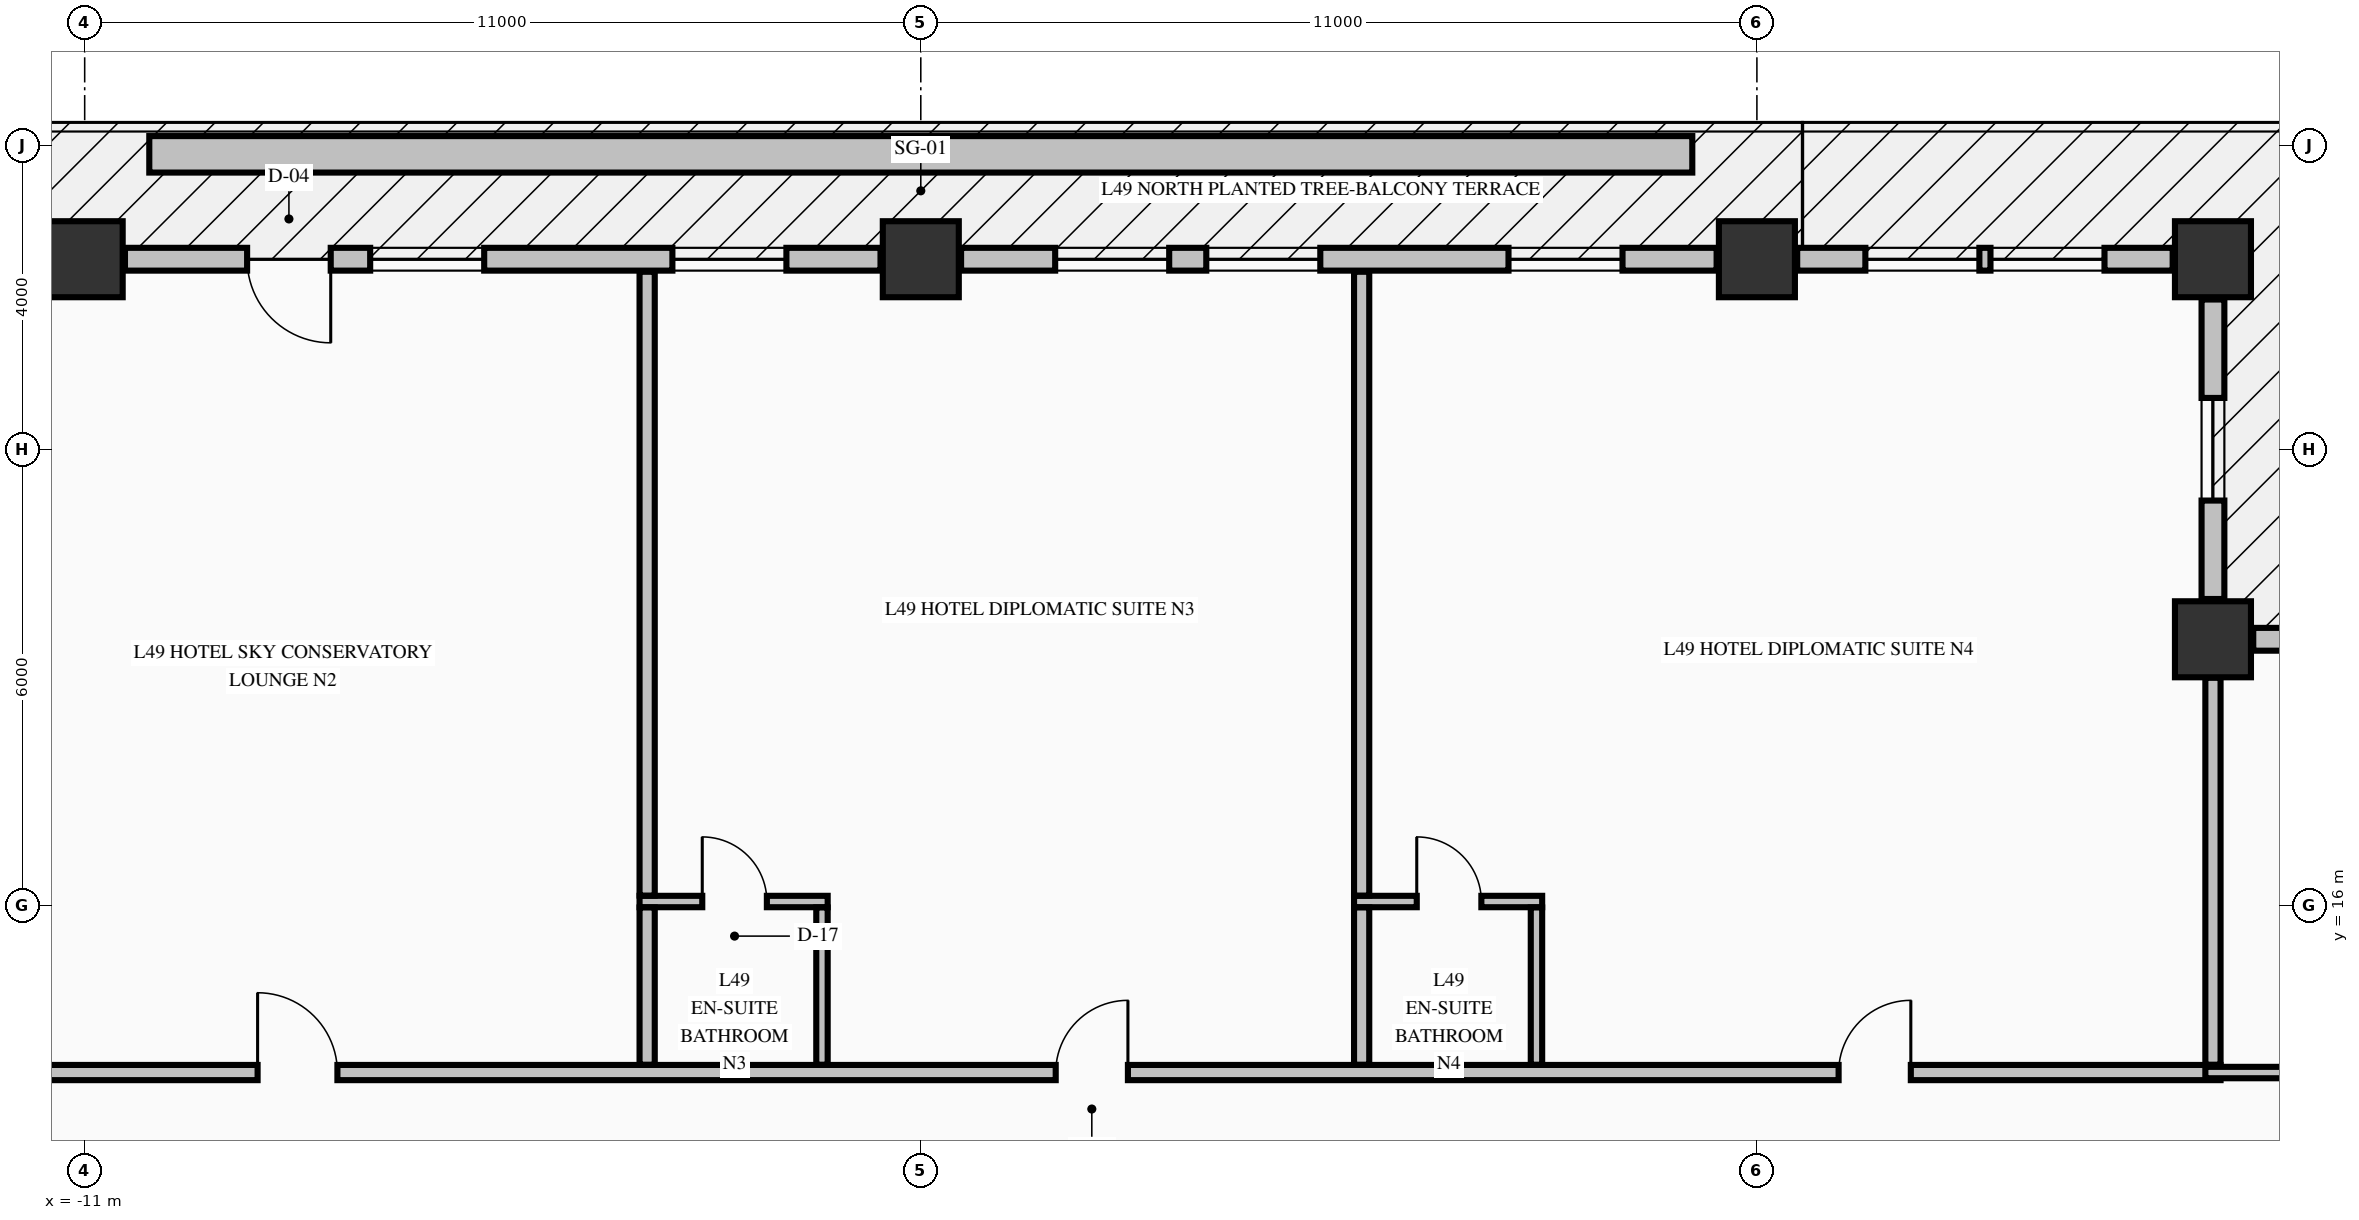
"""IFC4 building model, lengths in metres.
Left out: names, types, materials, properties, quantities, classifications, styles, units other than length and angle.
Written with IfcOpenShell. Run it as: python <this file> out.ifc"""

import sys

from ifc_helpers import new_model, si_unit, direction, frame, frame_2d, origin, origin_2d, place, context, subcontext, project, spatial, rectangle, extrude, element, fill, save


model = new_model("IFC4")
c1 = context("Model", 3, precision=1e-05, world=origin(), true_north=direction((0.0, 1.0)))
c2 = subcontext(c1, "Body", "Model", "MODEL_VIEW")
j1 = project(units=[si_unit("LENGTHUNIT", "METRE"), si_unit("PLANEANGLEUNIT", "RADIAN")], contexts=[c1])
p1 = place(None, origin())
s1 = spatial("IfcSite", under=j1, at=p1, CompositionType="ELEMENT")
p2 = place(p1, origin())
s2 = spatial("IfcBuilding", under=s1, at=p2, CompositionType="ELEMENT")
p3 = place(p2, frame((0.0, 0.0, 191.46)))
s3 = spatial("IfcBuildingStorey", under=s2, at=p3, CompositionType="ELEMENT", Elevation=191.46)
for number, where, z_axis, x_axis in (
    (1, (-11.0, 24.5, -0.425), (0.0, 0.0, 1.0), (1.0, 0.0, 0.0)),
    (2, (0.0, 24.5, -0.425), (0.0, 0.0, 1.0), (1.0, 0.0, 0.0)),
    (3, (11.0, 24.5, -0.425), (0.0, 0.0, 1.0), (1.0, 0.0, 0.0)),
    (4, (17.0, 24.5, -0.425), (0.0, 0.0, 1.0), (1.0, 0.0, 0.0)),
    (5, (17.0, 19.5, -0.425), (0.0, 0.0, 1.0), (1.0, 0.0, 0.0)),
):
    element("IfcColumn", number, at=place(p3, frame(where, z_axis=z_axis, x_axis=x_axis)), inside=s3, PredefinedType="COLUMN", context=c2, shape_type="SweptSolid", body=[
        extrude(rectangle(XDim=1.0, YDim=1.0, at=origin_2d()), origin(), (0.0, 0.0, 1.0), 3.55),
    ])
p4 = place(p3, frame((21.47, 19.5, 0.0), z_axis=(0.0, 0.0, 1.0), x_axis=(-1.0, 0.0, 0.0)))
e6 = element("IfcWall", 6, at=p4, inside=s3, PredefinedType="STANDARD", context=c2, shape_type="SweptSolid", body=[
    extrude(rectangle(XDim=3.94, YDim=0.3, at=frame_2d((1.97, 0.0))), origin(), (0.0, 0.0, 1.0), 2.517),
])
p5 = place(p4, frame((1.295, 0.0, 0.68)))
e7 = element("IfcOpeningElement", 7, at=p5, cuts=e6, PredefinedType="OPENING", context=c2, shape_type="SweptSolid", body=[
    extrude(rectangle(XDim=1.35, YDim=1.42, at=frame_2d((0.675, 0.71))), frame((0.0, 0.16, 0.0), z_axis=(0.0, -1.0, 0.0), x_axis=(1.0, 0.0, 0.0)), (0.0, 0.0, 1.0), 0.32),
])
p6 = place(p3, frame((17.0, 20.03, 0.0), z_axis=(0.0, 0.0, 1.0), x_axis=(0.0, 1.0, 0.0)))
e8 = element("IfcWall", 8, at=p6, inside=s3, PredefinedType="STANDARD", context=c2, shape_type="SweptSolid", body=[
    extrude(rectangle(XDim=3.94, YDim=0.3, at=frame_2d((1.97, 0.0))), origin(), (0.0, 0.0, 1.0), 2.517),
])
p7 = place(p6, frame((1.295, 0.0, 0.68)))
e9 = element("IfcOpeningElement", 9, at=p7, cuts=e8, PredefinedType="OPENING", context=c2, shape_type="SweptSolid", body=[
    extrude(rectangle(XDim=1.35, YDim=1.42, at=frame_2d((0.675, 0.71))), frame((0.0, 0.16, 0.0), z_axis=(0.0, -1.0, 0.0), x_axis=(1.0, 0.0, 0.0)), (0.0, 0.0, 1.0), 0.32),
])
p8 = place(p3, frame((-0.53, 24.5, 0.0), z_axis=(0.0, 0.0, 1.0), x_axis=(-1.0, 0.0, 0.0)))
e10 = element("IfcWall", 10, at=p8, inside=s3, PredefinedType="STANDARD", context=c2, shape_type="SweptSolid", body=[
    extrude(rectangle(XDim=9.94, YDim=0.3, at=frame_2d((4.97, 0.0))), origin(), (0.0, 0.0, 1.0), 2.517),
])
p9 = place(p8, frame((7.233, 0.0, 0.0)))
e11 = element("IfcOpeningElement", 11, at=p9, cuts=e10, PredefinedType="OPENING", context=c2, shape_type="SweptSolid", body=[
    extrude(rectangle(XDim=1.1, YDim=2.15, at=frame_2d((0.55, 1.075))), frame((0.0, 0.16, 0.0), z_axis=(0.0, -1.0, 0.0), x_axis=(1.0, 0.0, 0.0)), (0.0, 0.0, 1.0), 0.32),
])
p10 = place(p8, frame((1.238, 0.0, 0.72)))
e12 = element("IfcOpeningElement", 12, at=p10, cuts=e10, PredefinedType="OPENING", context=c2, shape_type="SweptSolid", body=[
    extrude(rectangle(XDim=1.5, YDim=1.6, at=frame_2d((0.75, 0.8))), frame((0.0, 0.16, 0.0), z_axis=(0.0, -1.0, 0.0), x_axis=(1.0, 0.0, 0.0)), (0.0, 0.0, 1.0), 0.32),
])
p11 = place(p8, frame((5.214, 0.0, 0.72)))
e13 = element("IfcOpeningElement", 13, at=p11, cuts=e10, PredefinedType="OPENING", context=c2, shape_type="SweptSolid", body=[
    extrude(rectangle(XDim=1.5, YDim=1.6, at=frame_2d((0.75, 0.8))), frame((0.0, 0.16, 0.0), z_axis=(0.0, -1.0, 0.0), x_axis=(1.0, 0.0, 0.0)), (0.0, 0.0, 1.0), 0.32),
])
p12 = place(p3, frame((10.47, 24.5, 0.0), z_axis=(0.0, 0.0, 1.0), x_axis=(-1.0, 0.0, 0.0)))
e14 = element("IfcWall", 14, at=p12, inside=s3, PredefinedType="STANDARD", context=c2, shape_type="SweptSolid", body=[
    extrude(rectangle(XDim=9.94, YDim=0.3, at=frame_2d((4.97, 0.0))), origin(), (0.0, 0.0, 1.0), 2.517),
])
p13 = place(p12, frame((1.238, 0.0, 0.72)))
e15 = element("IfcOpeningElement", 15, at=p13, cuts=e14, PredefinedType="OPENING", context=c2, shape_type="SweptSolid", body=[
    extrude(rectangle(XDim=1.5, YDim=1.6, at=frame_2d((0.75, 0.8))), frame((0.0, 0.16, 0.0), z_axis=(0.0, -1.0, 0.0), x_axis=(1.0, 0.0, 0.0)), (0.0, 0.0, 1.0), 0.32),
])
p14 = place(p12, frame((5.214, 0.0, 0.72)))
e16 = element("IfcOpeningElement", 16, at=p14, cuts=e14, PredefinedType="OPENING", context=c2, shape_type="SweptSolid", body=[
    extrude(rectangle(XDim=1.5, YDim=1.6, at=frame_2d((0.75, 0.8))), frame((0.0, 0.16, 0.0), z_axis=(0.0, -1.0, 0.0), x_axis=(1.0, 0.0, 0.0)), (0.0, 0.0, 1.0), 0.32),
])
p15 = place(p12, frame((7.202, 0.0, 0.72)))
e17 = element("IfcOpeningElement", 17, at=p15, cuts=e14, PredefinedType="OPENING", context=c2, shape_type="SweptSolid", body=[
    extrude(rectangle(XDim=1.5, YDim=1.6, at=frame_2d((0.75, 0.8))), frame((0.0, 0.16, 0.0), z_axis=(0.0, -1.0, 0.0), x_axis=(1.0, 0.0, 0.0)), (0.0, 0.0, 1.0), 0.32),
])
p16 = place(p3, frame((16.47, 24.5, 0.0), z_axis=(0.0, 0.0, 1.0), x_axis=(-1.0, 0.0, 0.0)))
e18 = element("IfcWall", 18, at=p16, inside=s3, PredefinedType="STANDARD", context=c2, shape_type="SweptSolid", body=[
    extrude(rectangle(XDim=4.94, YDim=0.3, at=frame_2d((2.47, 0.0))), origin(), (0.0, 0.0, 1.0), 2.517),
])
p17 = place(p16, frame((0.897, 0.0, 0.72)))
e19 = element("IfcOpeningElement", 19, at=p17, cuts=e18, PredefinedType="OPENING", context=c2, shape_type="SweptSolid", body=[
    extrude(rectangle(XDim=1.5, YDim=1.6, at=frame_2d((0.75, 0.8))), frame((0.0, 0.16, 0.0), z_axis=(0.0, -1.0, 0.0), x_axis=(1.0, 0.0, 0.0)), (0.0, 0.0, 1.0), 0.32),
])
p18 = place(p16, frame((2.543, 0.0, 0.72)))
e20 = element("IfcOpeningElement", 20, at=p18, cuts=e18, PredefinedType="OPENING", context=c2, shape_type="SweptSolid", body=[
    extrude(rectangle(XDim=1.5, YDim=1.6, at=frame_2d((0.75, 0.8))), frame((0.0, 0.16, 0.0), z_axis=(0.0, -1.0, 0.0), x_axis=(1.0, 0.0, 0.0)), (0.0, 0.0, 1.0), 0.32),
])
p19 = place(p3, frame((-22.1, 13.8, 0.0), z_axis=(0.0, 0.0, 1.0), x_axis=(1.0, 0.0, 0.0)))
e21 = element("IfcWall", 21, at=p19, inside=s3, PredefinedType="PARTITIONING", context=c2, shape_type="SweptSolid", body=[
    extrude(rectangle(XDim=39.2, YDim=0.2, at=frame_2d((19.6, 0.0))), origin(), (0.0, 0.0, 1.0), 3.125),
])
p20 = place(p19, frame((5.375, 0.0, 0.0)))
e22 = element("IfcOpeningElement", 22, at=p20, cuts=e21, PredefinedType="OPENING", context=c2, shape_type="SweptSolid", body=[
    extrude(rectangle(XDim=0.95, YDim=2.15, at=frame_2d((0.475, 1.075))), frame((0.0, 0.11, 0.0), z_axis=(0.0, -1.0, 0.0), x_axis=(1.0, 0.0, 0.0)), (0.0, 0.0, 1.0), 0.22),
])
p21 = place(p19, frame((13.375, 0.0, 0.0)))
e23 = element("IfcOpeningElement", 23, at=p21, cuts=e21, PredefinedType="OPENING", context=c2, shape_type="SweptSolid", body=[
    extrude(rectangle(XDim=1.05, YDim=2.15, at=frame_2d((0.525, 1.075))), frame((0.0, 0.11, 0.0), z_axis=(0.0, -1.0, 0.0), x_axis=(1.0, 0.0, 0.0)), (0.0, 0.0, 1.0), 0.22),
])
p22 = place(p19, frame((23.875, 0.0, 0.0)))
e24 = element("IfcOpeningElement", 24, at=p22, cuts=e21, PredefinedType="OPENING", context=c2, shape_type="SweptSolid", body=[
    extrude(rectangle(XDim=0.95, YDim=2.15, at=frame_2d((0.475, 1.075))), frame((0.0, 0.11, 0.0), z_axis=(0.0, -1.0, 0.0), x_axis=(1.0, 0.0, 0.0)), (0.0, 0.0, 1.0), 0.22),
])
p23 = place(p19, frame((34.175, 0.0, 0.0)))
e25 = element("IfcOpeningElement", 25, at=p23, cuts=e21, PredefinedType="OPENING", context=c2, shape_type="SweptSolid", body=[
    extrude(rectangle(XDim=0.95, YDim=2.15, at=frame_2d((0.475, 1.075))), frame((0.0, 0.11, 0.0), z_axis=(0.0, -1.0, 0.0), x_axis=(1.0, 0.0, 0.0)), (0.0, 0.0, 1.0), 0.22),
])
p24 = place(p3, frame((16.9, 13.8, 0.0), z_axis=(0.0, 0.0, 1.0), x_axis=(1.0, 0.0, 0.0)))
e26 = element("IfcWall", 26, at=p24, inside=s3, PredefinedType="PARTITIONING", context=c2, shape_type="SweptSolid", body=[
    extrude(rectangle(XDim=3.175, YDim=0.15, at=frame_2d((1.587, 0.0))), origin(), (0.0, 0.0, 1.0), 3.125),
])
p25 = place(p3, frame((-3.7, 16.05, 0.0), z_axis=(0.0, 0.0, 1.0), x_axis=(1.0, 0.0, 0.0)))
e27 = element("IfcWall", 27, at=p25, inside=s3, PredefinedType="PARTITIONING", context=c2, shape_type="SweptSolid", body=[
    extrude(rectangle(XDim=2.475, YDim=0.15, at=frame_2d((1.237, 0.0))), origin(), (0.0, 0.0, 1.0), 3.125),
])
p26 = place(p25, frame((0.825, 0.0, 0.0)))
e28 = element("IfcOpeningElement", 28, at=p26, cuts=e27, PredefinedType="OPENING", context=c2, shape_type="SweptSolid", body=[
    extrude(rectangle(XDim=0.85, YDim=2.1, at=frame_2d((0.425, 1.05))), frame((0.0, 0.085, 0.0), z_axis=(0.0, -1.0, 0.0), x_axis=(1.0, 0.0, 0.0)), (0.0, 0.0, 1.0), 0.17),
])
p27 = place(p3, frame((5.7, 16.05, 0.0), z_axis=(0.0, 0.0, 1.0), x_axis=(1.0, 0.0, 0.0)))
e29 = element("IfcWall", 29, at=p27, inside=s3, PredefinedType="PARTITIONING", context=c2, shape_type="SweptSolid", body=[
    extrude(rectangle(XDim=2.475, YDim=0.15, at=frame_2d((1.238, 0.0))), origin(), (0.0, 0.0, 1.0), 3.125),
])
p28 = place(p27, frame((0.825, 0.0, 0.0)))
e30 = element("IfcOpeningElement", 30, at=p28, cuts=e29, PredefinedType="OPENING", context=c2, shape_type="SweptSolid", body=[
    extrude(rectangle(XDim=0.85, YDim=2.1, at=frame_2d((0.425, 1.05))), frame((0.0, 0.085, 0.0), z_axis=(0.0, -1.0, 0.0), x_axis=(1.0, 0.0, 0.0)), (0.0, 0.0, 1.0), 0.17),
])
p29 = place(p3, frame((-3.6, 13.903, 0.0), z_axis=(0.0, 0.0, 1.0), x_axis=(0.0, 1.0, 0.0)))
e31 = element("IfcWall", 31, at=p29, inside=s3, PredefinedType="PARTITIONING", context=c2, shape_type="SweptSolid", body=[
    extrude(rectangle(XDim=2.069, YDim=0.2, at=frame_2d((1.034, 0.0))), origin(), (0.0, 0.0, 1.0), 3.125),
])
p30 = place(p3, frame((-3.6, 16.128, 0.0), z_axis=(0.0, 0.0, 1.0), x_axis=(0.0, 1.0, 0.0)))
e32 = element("IfcWall", 32, at=p30, inside=s3, PredefinedType="PARTITIONING", context=c2, shape_type="SweptSolid", body=[
    extrude(rectangle(XDim=8.207, YDim=0.2, at=frame_2d((4.104, 0.0))), origin(), (0.0, 0.0, 1.0), 3.125),
])
p31 = place(p3, frame((-1.3, 13.903, 0.0), z_axis=(0.0, 0.0, 1.0), x_axis=(0.0, 1.0, 0.0)))
e33 = element("IfcWall", 33, at=p31, inside=s3, PredefinedType="PARTITIONING", context=c2, shape_type="SweptSolid", body=[
    extrude(rectangle(XDim=2.069, YDim=0.15, at=frame_2d((1.034, 0.0))), origin(), (0.0, 0.0, 1.0), 3.125),
])
p32 = place(p3, frame((5.8, 13.903, 0.0), z_axis=(0.0, 0.0, 1.0), x_axis=(0.0, 1.0, 0.0)))
e34 = element("IfcWall", 34, at=p32, inside=s3, PredefinedType="PARTITIONING", context=c2, shape_type="SweptSolid", body=[
    extrude(rectangle(XDim=2.069, YDim=0.2, at=frame_2d((1.034, 0.0))), origin(), (0.0, 0.0, 1.0), 3.125),
])
p33 = place(p3, frame((5.8, 16.128, 0.0), z_axis=(0.0, 0.0, 1.0), x_axis=(0.0, 1.0, 0.0)))
e35 = element("IfcWall", 35, at=p33, inside=s3, PredefinedType="PARTITIONING", context=c2, shape_type="SweptSolid", body=[
    extrude(rectangle(XDim=8.207, YDim=0.2, at=frame_2d((4.104, 0.0))), origin(), (0.0, 0.0, 1.0), 3.125),
])
p34 = place(p3, frame((8.1, 13.903, 0.0), z_axis=(0.0, 0.0, 1.0), x_axis=(0.0, 1.0, 0.0)))
e36 = element("IfcWall", 36, at=p34, inside=s3, PredefinedType="PARTITIONING", context=c2, shape_type="SweptSolid", body=[
    extrude(rectangle(XDim=2.069, YDim=0.15, at=frame_2d((1.034, 0.0))), origin(), (0.0, 0.0, 1.0), 3.125),
])
p35 = place(p3, frame((17.0, 13.903, 0.0), z_axis=(0.0, 0.0, 1.0), x_axis=(0.0, 1.0, 0.0)))
e37 = element("IfcWall", 37, at=p35, inside=s3, PredefinedType="PARTITIONING", context=c2, shape_type="SweptSolid", body=[
    extrude(rectangle(XDim=5.091, YDim=0.2, at=frame_2d((2.545, 0.0))), origin(), (0.0, 0.0, 1.0), 3.125),
])
p36 = place(p3, frame((-10.15, 25.88, -0.04), z_axis=(0.0, 0.0, 1.0), x_axis=(1.0, 0.0, 0.0)))
e38 = element("IfcWall", 38, at=p36, inside=s3, PredefinedType="PARAPET", context=c2, shape_type="SweptSolid", body=[
    extrude(rectangle(XDim=20.3, YDim=0.48, at=frame_2d((10.15, 0.0))), origin(), (0.0, 0.0, 1.0), 0.52),
])
p37 = place(p7, origin())
e39 = element("IfcWindow", 39, at=p37, inside=s3, PartitioningType="SINGLE_PANEL", PredefinedType="WINDOW", context=c2, shape_type="SweptSolid", body=[
    extrude(rectangle(XDim=1.35, YDim=1.42, at=frame_2d((0.675, 0.71))), frame((0.0, 0.03, 0.0), z_axis=(0.0, -1.0, 0.0), x_axis=(1.0, 0.0, 0.0)), (0.0, 0.0, 1.0), 0.06),
])
fill(e9, e39)
p38 = place(p9, origin())
e40 = element("IfcDoor", 40, at=p38, inside=s3, OperationType="SINGLE_SWING_LEFT", PredefinedType="DOOR", context=c2, shape_type="SweptSolid", body=[
    extrude(rectangle(XDim=1.1, YDim=2.15, at=frame_2d((0.55, 1.075))), frame((0.0, 0.025, 0.0), z_axis=(0.0, -1.0, 0.0), x_axis=(1.0, 0.0, 0.0)), (0.0, 0.0, 1.0), 0.05),
])
fill(e11, e40)
p39 = place(p10, origin())
e41 = element("IfcWindow", 41, at=p39, inside=s3, PartitioningType="SINGLE_PANEL", PredefinedType="WINDOW", context=c2, shape_type="SweptSolid", body=[
    extrude(rectangle(XDim=1.5, YDim=1.6, at=frame_2d((0.75, 0.8))), frame((0.0, 0.03, 0.0), z_axis=(0.0, -1.0, 0.0), x_axis=(1.0, 0.0, 0.0)), (0.0, 0.0, 1.0), 0.06),
])
fill(e12, e41)
p40 = place(p11, origin())
e42 = element("IfcWindow", 42, at=p40, inside=s3, PartitioningType="SINGLE_PANEL", PredefinedType="WINDOW", context=c2, shape_type="SweptSolid", body=[
    extrude(rectangle(XDim=1.5, YDim=1.6, at=frame_2d((0.75, 0.8))), frame((0.0, 0.03, 0.0), z_axis=(0.0, -1.0, 0.0), x_axis=(1.0, 0.0, 0.0)), (0.0, 0.0, 1.0), 0.06),
])
fill(e13, e42)
p41 = place(p13, origin())
e43 = element("IfcWindow", 43, at=p41, inside=s3, PartitioningType="SINGLE_PANEL", PredefinedType="WINDOW", context=c2, shape_type="SweptSolid", body=[
    extrude(rectangle(XDim=1.5, YDim=1.6, at=frame_2d((0.75, 0.8))), frame((0.0, 0.03, 0.0), z_axis=(0.0, -1.0, 0.0), x_axis=(1.0, 0.0, 0.0)), (0.0, 0.0, 1.0), 0.06),
])
fill(e15, e43)
p42 = place(p14, origin())
e44 = element("IfcWindow", 44, at=p42, inside=s3, PartitioningType="SINGLE_PANEL", PredefinedType="WINDOW", context=c2, shape_type="SweptSolid", body=[
    extrude(rectangle(XDim=1.5, YDim=1.6, at=frame_2d((0.75, 0.8))), frame((0.0, 0.03, 0.0), z_axis=(0.0, -1.0, 0.0), x_axis=(1.0, 0.0, 0.0)), (0.0, 0.0, 1.0), 0.06),
])
fill(e16, e44)
p43 = place(p15, origin())
e45 = element("IfcWindow", 45, at=p43, inside=s3, PartitioningType="SINGLE_PANEL", PredefinedType="WINDOW", context=c2, shape_type="SweptSolid", body=[
    extrude(rectangle(XDim=1.5, YDim=1.6, at=frame_2d((0.75, 0.8))), frame((0.0, 0.03, 0.0), z_axis=(0.0, -1.0, 0.0), x_axis=(1.0, 0.0, 0.0)), (0.0, 0.0, 1.0), 0.06),
])
fill(e17, e45)
p44 = place(p17, origin())
e46 = element("IfcWindow", 46, at=p44, inside=s3, PartitioningType="SINGLE_PANEL", PredefinedType="WINDOW", context=c2, shape_type="SweptSolid", body=[
    extrude(rectangle(XDim=1.5, YDim=1.6, at=frame_2d((0.75, 0.8))), frame((0.0, 0.03, 0.0), z_axis=(0.0, -1.0, 0.0), x_axis=(1.0, 0.0, 0.0)), (0.0, 0.0, 1.0), 0.06),
])
fill(e19, e46)
p45 = place(p18, origin())
e47 = element("IfcWindow", 47, at=p45, inside=s3, PartitioningType="SINGLE_PANEL", PredefinedType="WINDOW", context=c2, shape_type="SweptSolid", body=[
    extrude(rectangle(XDim=1.5, YDim=1.6, at=frame_2d((0.75, 0.8))), frame((0.0, 0.03, 0.0), z_axis=(0.0, -1.0, 0.0), x_axis=(1.0, 0.0, 0.0)), (0.0, 0.0, 1.0), 0.06),
])
fill(e20, e47)
p46 = place(p21, origin())
e48 = element("IfcDoor", 48, at=p46, inside=s3, OperationType="SINGLE_SWING_LEFT", PredefinedType="DOOR", context=c2, shape_type="SweptSolid", body=[
    extrude(rectangle(XDim=1.05, YDim=2.15, at=frame_2d((0.525, 1.075))), frame((0.0, 0.025, 0.0), z_axis=(0.0, -1.0, 0.0), x_axis=(1.0, 0.0, 0.0)), (0.0, 0.0, 1.0), 0.05),
])
fill(e23, e48)
p47 = place(p22, origin())
e49 = element("IfcDoor", 49, at=p47, inside=s3, OperationType="SINGLE_SWING_RIGHT", PredefinedType="DOOR", context=c2, shape_type="SweptSolid", body=[
    extrude(rectangle(XDim=0.95, YDim=2.15, at=frame_2d((0.475, 1.075))), frame((0.0, 0.025, 0.0), z_axis=(0.0, -1.0, 0.0), x_axis=(1.0, 0.0, 0.0)), (0.0, 0.0, 1.0), 0.05),
])
fill(e24, e49)
p48 = place(p26, origin())
e50 = element("IfcDoor", 50, at=p48, inside=s3, OperationType="SINGLE_SWING_LEFT", PredefinedType="DOOR", context=c2, shape_type="SweptSolid", body=[
    extrude(rectangle(XDim=0.85, YDim=2.1, at=frame_2d((0.425, 1.05))), frame((0.0, 0.025, 0.0), z_axis=(0.0, -1.0, 0.0), x_axis=(1.0, 0.0, 0.0)), (0.0, 0.0, 1.0), 0.05),
])
fill(e28, e50)
p49 = place(p23, origin())
e51 = element("IfcDoor", 51, at=p49, inside=s3, OperationType="SINGLE_SWING_RIGHT", PredefinedType="DOOR", context=c2, shape_type="SweptSolid", body=[
    extrude(rectangle(XDim=0.95, YDim=2.15, at=frame_2d((0.475, 1.075))), frame((0.0, 0.025, 0.0), z_axis=(0.0, -1.0, 0.0), x_axis=(1.0, 0.0, 0.0)), (0.0, 0.0, 1.0), 0.05),
])
fill(e25, e51)
p50 = place(p28, origin())
e52 = element("IfcDoor", 52, at=p50, inside=s3, OperationType="SINGLE_SWING_LEFT", PredefinedType="DOOR", context=c2, shape_type="SweptSolid", body=[
    extrude(rectangle(XDim=0.85, YDim=2.1, at=frame_2d((0.425, 1.05))), frame((0.0, 0.025, 0.0), z_axis=(0.0, -1.0, 0.0), x_axis=(1.0, 0.0, 0.0)), (0.0, 0.0, 1.0), 0.05),
])
fill(e30, e52)
save(model, sys.argv[1])
